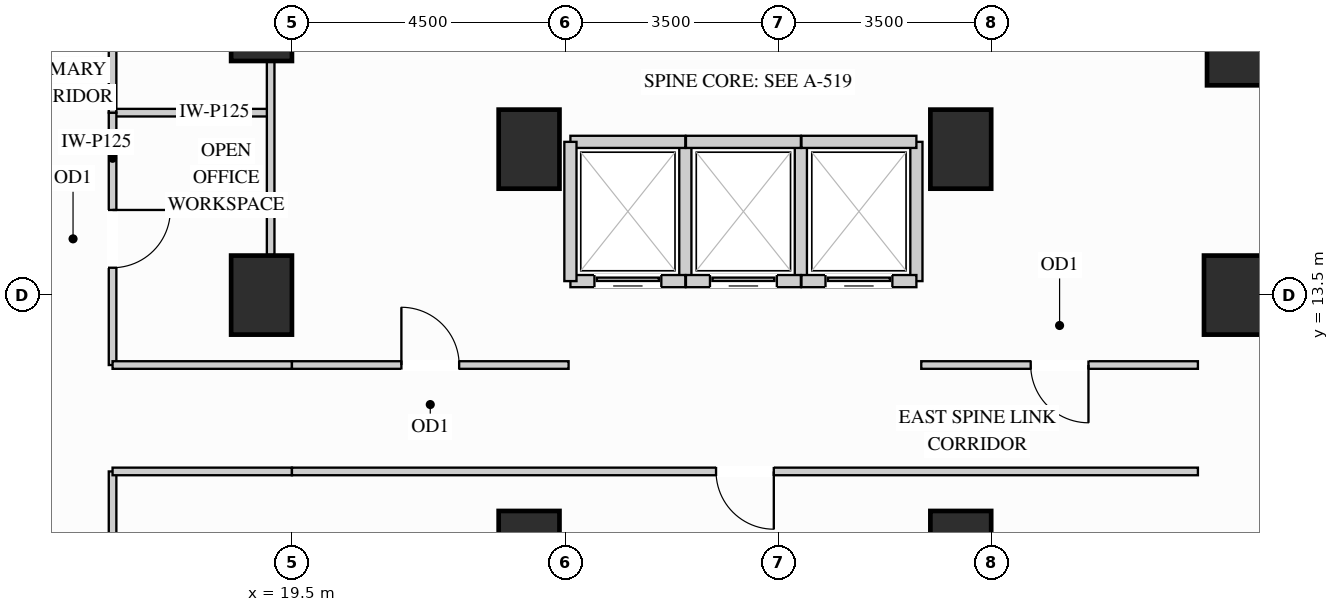
"""IFC4 building model, lengths in metres.
Left out: names, types, materials, properties, quantities, classifications, styles, units other than length and angle.
Written with IfcOpenShell. Run it as: python <this file> out.ifc"""

import sys

from ifc_helpers import new_model, si_unit, direction, frame, frame_2d, origin, origin_2d, place, context, subcontext, project, spatial, rectangle, extrude, source, transform, mapped, element, fill, save


model = new_model("IFC4")
c1 = context("Model", 3, precision=1e-05, world=origin(), true_north=direction((0.0, 1.0)))
c2 = subcontext(c1, "Body", "Model", "MODEL_VIEW")
j1 = project(units=[si_unit("LENGTHUNIT", "METRE"), si_unit("PLANEANGLEUNIT", "RADIAN")], contexts=[c1])
p1 = place(None, origin())
s1 = spatial("IfcSite", under=j1, at=p1, CompositionType="ELEMENT")
p2 = place(p1, origin())
s2 = spatial("IfcBuilding", under=s1, at=p2, CompositionType="ELEMENT")
p3 = place(p2, frame((0.0, 0.0, 44.1)))
s3 = spatial("IfcBuildingStorey", under=s2, at=p3, CompositionType="ELEMENT", Elevation=44.1)
m1 = source(origin(), c2, "Body", "SweptSolid", [
    extrude(rectangle(XDim=0.9, YDim=0.9, at=origin_2d()), origin(), (0.0, 0.0, 1.0), 3.38),
])
p4 = place(p3, frame((35.0, 17.4, 0.0), z_axis=(0.0, 0.0, 1.0), x_axis=(1.0, 0.0, 0.0)))
e1 = element("IfcColumn", 1, at=p4, inside=s3, PredefinedType="COLUMN", context=c2, shape_type="MappedRepresentation", body=[
    mapped(m1, transform((0.0, 0.0, 0.0), x_axis=(1.0, 0.0, 0.0), y_axis=(0.0, 1.0, 0.0), z_axis=(0.0, 0.0, 1.0))),
])
m2 = source(origin(), c2, "Body", "SweptSolid", [
    extrude(rectangle(XDim=1.0, YDim=1.3, at=origin_2d()), origin(), (0.0, 0.0, 1.0), 3.38),
])
for number, where, z_axis, x_axis in (
    (2, (19.0, 13.5, 0.0), (0.0, 0.0, 1.0), (1.0, 0.0, 0.0)),
    (3, (19.0, 18.0, 0.0), (0.0, 0.0, 1.0), (1.0, 0.0, 0.0)),
    (4, (35.0, 13.5, 0.0), (0.0, 0.0, 1.0), (1.0, 0.0, 0.0)),
    (5, (23.4, 15.9, 0.0), (0.0, 0.0, 1.0), (1.0, 0.0, 0.0)),
    (6, (23.4, 9.3, 0.0), (0.0, 0.0, 1.0), (1.0, 0.0, 0.0)),
    (7, (30.5, 15.9, 0.0), (0.0, 0.0, 1.0), (1.0, 0.0, 0.0)),
    (8, (30.5, 9.3, 0.0), (0.0, 0.0, 1.0), (1.0, 0.0, 0.0)),
):
    element("IfcColumn", number, at=place(p3, frame(where, z_axis=z_axis, x_axis=x_axis)), inside=s3, PredefinedType="COLUMN", context=c2, shape_type="MappedRepresentation", body=[
        mapped(m2, transform((0.0, 0.0, 0.0), x_axis=(1.0, 0.0, 0.0), y_axis=(0.0, 1.0, 0.0), z_axis=(0.0, 0.0, 1.0))),
    ])
m3 = source(origin(), c2, "Body", "SweptSolid", [
    extrude(rectangle(XDim=2.6, YDim=0.125, at=frame_2d((1.3, 0.0))), origin(), (0.0, 0.0, 1.0), 2.896),
])
p5 = place(p3, frame((16.55, 16.5, 0.0), z_axis=(0.0, 0.0, 1.0), x_axis=(1.0, 0.0, 0.0)))
e9 = element("IfcWall", 9, at=p5, inside=s3, PredefinedType="PARTITIONING", context=c2, shape_type="MappedRepresentation", body=[
    mapped(m3, transform((0.0, 0.0, 0.0), x_axis=(1.0, 0.0, 0.0), y_axis=(0.0, 1.0, 0.0), z_axis=(0.0, 0.0, 1.0))),
])
m4 = source(origin(), c2, "Body", "SweptSolid", [
    extrude(rectangle(XDim=3.18, YDim=0.125, at=frame_2d((1.59, 0.0))), origin(), (0.0, 0.0, 1.0), 2.67),
])
p6 = place(p3, frame((19.15, 14.16, 0.0), z_axis=(0.0, 0.0, 1.0), x_axis=(0.0, 1.0, 0.0)))
e10 = element("IfcWall", 10, at=p6, inside=s3, PredefinedType="PARTITIONING", context=c2, shape_type="MappedRepresentation", body=[
    mapped(m4, transform((0.0, 0.0, 0.0), x_axis=(1.0, 0.0, 0.0), y_axis=(0.0, 1.0, 0.0), z_axis=(0.0, 0.0, 1.0))),
])
p7 = place(p3, frame((16.55, 12.35, 0.0), z_axis=(0.0, 0.0, 1.0), x_axis=(0.0, 1.0, 0.0)))
e11 = element("IfcWall", 11, at=p7, inside=s3, PredefinedType="PARTITIONING", context=c2, shape_type="SweptSolid", body=[
    extrude(rectangle(XDim=4.15, YDim=0.125, at=frame_2d((2.075, 0.0))), origin(), (0.0, 0.0, 1.0), 3.365),
])
p8 = place(p7, frame((1.6, 0.0, 0.0)))
e12 = element("IfcOpeningElement", 12, at=p8, cuts=e11, PredefinedType="OPENING", context=c2, shape_type="SweptSolid", body=[
    extrude(rectangle(XDim=0.95, YDim=2.15, at=frame_2d((0.475, 1.075))), frame((0.0, 0.073, 0.0), z_axis=(0.0, -1.0, 0.0), x_axis=(1.0, 0.0, 0.0)), (0.0, 0.0, 1.0), 0.145),
])
p9 = place(p3, frame((16.55, 16.5, 0.0), z_axis=(0.0, 0.0, 1.0), x_axis=(0.0, 1.0, 0.0)))
e13 = element("IfcWall", 13, at=p9, inside=s3, PredefinedType="PARTITIONING", context=c2, shape_type="SweptSolid", body=[
    extrude(rectangle(XDim=6.85, YDim=0.125, at=frame_2d((3.425, 0.0))), origin(), (0.0, 0.0, 1.0), 3.365),
])
p10 = place(p9, frame((2.95, 0.0, 0.0)))
e14 = element("IfcOpeningElement", 14, at=p10, cuts=e13, PredefinedType="OPENING", context=c2, shape_type="SweptSolid", body=[
    extrude(rectangle(XDim=0.95, YDim=2.15, at=frame_2d((0.475, 1.075))), frame((0.0, 0.073, 0.0), z_axis=(0.0, -1.0, 0.0), x_axis=(1.0, 0.0, 0.0)), (0.0, 0.0, 1.0), 0.145),
])
p11 = place(p3, frame((16.55, 4.65, 0.0), z_axis=(0.0, 0.0, 1.0), x_axis=(0.0, 1.0, 0.0)))
e15 = element("IfcWall", 15, at=p11, inside=s3, PredefinedType="PARTITIONING", context=c2, shape_type="SweptSolid", body=[
    extrude(rectangle(XDim=5.95, YDim=0.125, at=frame_2d((2.975, 0.0))), origin(), (0.0, 0.0, 1.0), 3.365),
])
p12 = place(p11, frame((2.5, 0.0, 0.0)))
e16 = element("IfcOpeningElement", 16, at=p12, cuts=e15, PredefinedType="OPENING", context=c2, shape_type="SweptSolid", body=[
    extrude(rectangle(XDim=0.95, YDim=2.15, at=frame_2d((0.475, 1.075))), frame((0.0, 0.073, 0.0), z_axis=(0.0, -1.0, 0.0), x_axis=(1.0, 0.0, 0.0)), (0.0, 0.0, 1.0), 0.145),
])
p13 = place(p3, frame((29.85, 12.35, 0.0), z_axis=(0.0, 0.0, 1.0), x_axis=(1.0, 0.0, 0.0)))
e17 = element("IfcWall", 17, at=p13, inside=s3, PredefinedType="PARTITIONING", context=c2, shape_type="SweptSolid", body=[
    extrude(rectangle(XDim=4.55, YDim=0.125, at=frame_2d((2.275, 0.0))), origin(), (0.0, 0.0, 1.0), 3.365),
])
p14 = place(p13, frame((1.8, 0.0, 0.0)))
e18 = element("IfcOpeningElement", 18, at=p14, cuts=e17, PredefinedType="OPENING", context=c2, shape_type="SweptSolid", body=[
    extrude(rectangle(XDim=0.95, YDim=2.15, at=frame_2d((0.475, 1.075))), frame((0.0, 0.073, 0.0), z_axis=(0.0, -1.0, 0.0), x_axis=(1.0, 0.0, 0.0)), (0.0, 0.0, 1.0), 0.145),
])
m5 = source(origin(), c2, "Body", "SweptSolid", [
    extrude(rectangle(XDim=2.95, YDim=0.125, at=frame_2d((1.475, 0.0))), origin(), (0.0, 0.0, 1.0), 3.365),
])
p15 = place(p3, frame((16.55, 12.35, 0.0), z_axis=(0.0, 0.0, 1.0), x_axis=(1.0, 0.0, 0.0)))
e19 = element("IfcWall", 19, at=p15, inside=s3, PredefinedType="PARTITIONING", context=c2, shape_type="MappedRepresentation", body=[
    mapped(m5, transform((0.0, 0.0, 0.0), x_axis=(1.0, 0.0, 0.0), y_axis=(0.0, 1.0, 0.0), z_axis=(0.0, 0.0, 1.0))),
])
p16 = place(p3, frame((19.5, 12.35, 0.0), z_axis=(0.0, 0.0, 1.0), x_axis=(1.0, 0.0, 0.0)))
e20 = element("IfcWall", 20, at=p16, inside=s3, PredefinedType="PARTITIONING", context=c2, shape_type="SweptSolid", body=[
    extrude(rectangle(XDim=4.55, YDim=0.125, at=frame_2d((2.275, 0.0))), origin(), (0.0, 0.0, 1.0), 3.365),
])
p17 = place(p16, frame((1.8, 0.0, 0.0)))
e21 = element("IfcOpeningElement", 21, at=p17, cuts=e20, PredefinedType="OPENING", context=c2, shape_type="SweptSolid", body=[
    extrude(rectangle(XDim=0.95, YDim=2.15, at=frame_2d((0.475, 1.075))), frame((0.0, 0.073, 0.0), z_axis=(0.0, -1.0, 0.0), x_axis=(1.0, 0.0, 0.0)), (0.0, 0.0, 1.0), 0.145),
])
p18 = place(p3, frame((16.55, 10.6, 0.0), z_axis=(0.0, 0.0, 1.0), x_axis=(1.0, 0.0, 0.0)))
e22 = element("IfcWall", 22, at=p18, inside=s3, PredefinedType="PARTITIONING", context=c2, shape_type="MappedRepresentation", body=[
    mapped(m5, transform((0.0, 0.0, 0.0), x_axis=(1.0, 0.0, 0.0), y_axis=(0.0, 1.0, 0.0), z_axis=(0.0, 0.0, 1.0))),
])
p19 = place(p3, frame((19.5, 10.6, 0.0), z_axis=(0.0, 0.0, 1.0), x_axis=(1.0, 0.0, 0.0)))
e23 = element("IfcWall", 23, at=p19, inside=s3, PredefinedType="PARTITIONING", context=c2, shape_type="SweptSolid", body=[
    extrude(rectangle(XDim=14.9, YDim=0.125, at=frame_2d((7.45, 0.0))), origin(), (0.0, 0.0, 1.0), 3.365),
])
p20 = place(p19, frame((6.975, 0.0, 0.0)))
e24 = element("IfcOpeningElement", 24, at=p20, cuts=e23, PredefinedType="OPENING", context=c2, shape_type="SweptSolid", body=[
    extrude(rectangle(XDim=0.95, YDim=2.15, at=frame_2d((0.475, 1.075))), frame((0.0, 0.073, 0.0), z_axis=(0.0, -1.0, 0.0), x_axis=(1.0, 0.0, 0.0)), (0.0, 0.0, 1.0), 0.145),
])
m6 = source(origin(), c2, "Body", "SweptSolid", [
    extrude(rectangle(XDim=2.29, YDim=0.2, at=frame_2d((1.145, 0.0))), origin(), (0.0, 0.0, 1.0), 3.365),
])
p21 = place(p3, frame((25.97, 13.73, 0.0), z_axis=(0.0, 0.0, 1.0), x_axis=(0.0, 1.0, 0.0)))
e25 = element("IfcWall", 25, at=p21, inside=s3, PredefinedType="PARTITIONING", context=c2, shape_type="MappedRepresentation", body=[
    mapped(m6, transform((0.0, 0.0, 0.0), x_axis=(1.0, 0.0, 0.0), y_axis=(0.0, 1.0, 0.0), z_axis=(0.0, 0.0, 1.0))),
])
m7 = source(origin(), c2, "Body", "SweptSolid", [
    extrude(rectangle(XDim=1.89, YDim=0.2, at=frame_2d((0.945, 0.0))), origin(), (0.0, 0.0, 1.0), 2.67),
])
p22 = place(p3, frame((24.08, 16.02, 0.0), z_axis=(0.0, 0.0, 1.0), x_axis=(1.0, 0.0, 0.0)))
e26 = element("IfcWall", 26, at=p22, inside=s3, PredefinedType="PARTITIONING", context=c2, shape_type="MappedRepresentation", body=[
    mapped(m7, transform((0.0, 0.0, 0.0), x_axis=(1.0, 0.0, 0.0), y_axis=(0.0, 1.0, 0.0), z_axis=(0.0, 0.0, 1.0))),
])
p23 = place(p3, frame((24.08, 13.73, 0.0), z_axis=(0.0, 0.0, 1.0), x_axis=(1.0, 0.0, 0.0)))
e27 = element("IfcWall", 27, at=p23, inside=s3, PredefinedType="PARTITIONING", context=c2, shape_type="SweptSolid", body=[
    extrude(rectangle(XDim=1.89, YDim=0.2, at=frame_2d((0.945, 0.0))), origin(), (0.0, 0.0, 1.0), 2.446),
])
p24 = place(p23, frame((0.395, 0.0, 0.0)))
e28 = element("IfcOpeningElement", 28, at=p24, cuts=e27, PredefinedType="OPENING", context=c2, shape_type="SweptSolid", body=[
    extrude(rectangle(XDim=1.1, YDim=2.2, at=frame_2d((0.55, 1.1))), frame((0.0, 0.11, 0.0), z_axis=(0.0, -1.0, 0.0), x_axis=(1.0, 0.0, 0.0)), (0.0, 0.0, 1.0), 0.22),
])
for number, where, z_axis, x_axis in (
    (29, (24.08, 13.73, 0.0), (0.0, 0.0, 1.0), (0.0, 1.0, 0.0)),
    (30, (27.87, 13.73, 0.0), (0.0, 0.0, 1.0), (0.0, 1.0, 0.0)),
):
    element("IfcWall", number, at=place(p3, frame(where, z_axis=z_axis, x_axis=x_axis)), inside=s3, PredefinedType="PARTITIONING", context=c2, shape_type="MappedRepresentation", body=[
        mapped(m6, transform((0.0, 0.0, 0.0), x_axis=(1.0, 0.0, 0.0), y_axis=(0.0, 1.0, 0.0), z_axis=(0.0, 0.0, 1.0))),
    ])
m8 = source(origin(), c2, "Body", "SweptSolid", [
    extrude(rectangle(XDim=1.89, YDim=0.2, at=frame_2d((0.945, 0.0))), origin(), (0.0, 0.0, 1.0), 2.67),
])
p25 = place(p3, frame((25.98, 16.02, 0.0), z_axis=(0.0, 0.0, 1.0), x_axis=(1.0, 0.0, 0.0)))
e31 = element("IfcWall", 31, at=p25, inside=s3, PredefinedType="PARTITIONING", context=c2, shape_type="MappedRepresentation", body=[
    mapped(m8, transform((0.0, 0.0, 0.0), x_axis=(1.0, 0.0, 0.0), y_axis=(0.0, 1.0, 0.0), z_axis=(0.0, 0.0, 1.0))),
])
p26 = place(p3, frame((25.98, 13.73, 0.0), z_axis=(0.0, 0.0, 1.0), x_axis=(1.0, 0.0, 0.0)))
e32 = element("IfcWall", 32, at=p26, inside=s3, PredefinedType="PARTITIONING", context=c2, shape_type="SweptSolid", body=[
    extrude(rectangle(XDim=1.89, YDim=0.2, at=frame_2d((0.945, 0.0))), origin(), (0.0, 0.0, 1.0), 2.446),
])
p27 = place(p26, frame((0.395, 0.0, 0.0)))
e33 = element("IfcOpeningElement", 33, at=p27, cuts=e32, PredefinedType="OPENING", context=c2, shape_type="SweptSolid", body=[
    extrude(rectangle(XDim=1.1, YDim=2.2, at=frame_2d((0.55, 1.1))), frame((0.0, 0.11, 0.0), z_axis=(0.0, -1.0, 0.0), x_axis=(1.0, 0.0, 0.0)), (0.0, 0.0, 1.0), 0.22),
])
p28 = place(p3, frame((29.77, 13.73, 0.0), z_axis=(0.0, 0.0, 1.0), x_axis=(0.0, 1.0, 0.0)))
e34 = element("IfcWall", 34, at=p28, inside=s3, PredefinedType="PARTITIONING", context=c2, shape_type="MappedRepresentation", body=[
    mapped(m6, transform((0.0, 0.0, 0.0), x_axis=(1.0, 0.0, 0.0), y_axis=(0.0, 1.0, 0.0), z_axis=(0.0, 0.0, 1.0))),
])
p29 = place(p3, frame((27.88, 16.02, 0.0), z_axis=(0.0, 0.0, 1.0), x_axis=(1.0, 0.0, 0.0)))
e35 = element("IfcWall", 35, at=p29, inside=s3, PredefinedType="PARTITIONING", context=c2, shape_type="MappedRepresentation", body=[
    mapped(m8, transform((0.0, 0.0, 0.0), x_axis=(1.0, 0.0, 0.0), y_axis=(0.0, 1.0, 0.0), z_axis=(0.0, 0.0, 1.0))),
])
p30 = place(p3, frame((27.88, 13.73, 0.0), z_axis=(0.0, 0.0, 1.0), x_axis=(1.0, 0.0, 0.0)))
e36 = element("IfcWall", 36, at=p30, inside=s3, PredefinedType="PARTITIONING", context=c2, shape_type="SweptSolid", body=[
    extrude(rectangle(XDim=1.89, YDim=0.2, at=frame_2d((0.945, 0.0))), origin(), (0.0, 0.0, 1.0), 2.446),
])
p31 = place(p30, frame((0.395, 0.0, 0.0)))
e37 = element("IfcOpeningElement", 37, at=p31, cuts=e36, PredefinedType="OPENING", context=c2, shape_type="SweptSolid", body=[
    extrude(rectangle(XDim=1.1, YDim=2.2, at=frame_2d((0.55, 1.1))), frame((0.0, 0.11, 0.0), z_axis=(0.0, -1.0, 0.0), x_axis=(1.0, 0.0, 0.0)), (0.0, 0.0, 1.0), 0.22),
])
m9 = source(origin(), c2, "Body", "SweptSolid", [
    extrude(rectangle(XDim=1.1, YDim=2.2, at=frame_2d((0.55, 1.1))), frame((0.0, 0.025, 0.0), z_axis=(0.0, -1.0, 0.0), x_axis=(1.0, 0.0, 0.0)), (0.0, 0.0, 1.0), 0.05),
])
p32 = place(p24, origin())
e38 = element("IfcDoor", 38, at=p32, inside=s3, OperationType="SLIDING_TO_LEFT", PredefinedType="DOOR", context=c2, shape_type="MappedRepresentation", body=[
    mapped(m9, transform((0.0, 0.0, 0.0), x_axis=(1.0, 0.0, 0.0), y_axis=(0.0, 1.0, 0.0), z_axis=(0.0, 0.0, 1.0))),
])
fill(e28, e38)
p33 = place(p27, origin())
e39 = element("IfcDoor", 39, at=p33, inside=s3, OperationType="SLIDING_TO_LEFT", PredefinedType="DOOR", context=c2, shape_type="MappedRepresentation", body=[
    mapped(m9, transform((0.0, 0.0, 0.0), x_axis=(1.0, 0.0, 0.0), y_axis=(0.0, 1.0, 0.0), z_axis=(0.0, 0.0, 1.0))),
])
fill(e33, e39)
p34 = place(p31, origin())
e40 = element("IfcDoor", 40, at=p34, inside=s3, OperationType="SLIDING_TO_LEFT", PredefinedType="DOOR", context=c2, shape_type="MappedRepresentation", body=[
    mapped(m9, transform((0.0, 0.0, 0.0), x_axis=(1.0, 0.0, 0.0), y_axis=(0.0, 1.0, 0.0), z_axis=(0.0, 0.0, 1.0))),
])
fill(e37, e40)
m10 = source(origin(), c2, "Body", "SweptSolid", [
    extrude(rectangle(XDim=0.95, YDim=2.15, at=frame_2d((0.475, 1.075))), frame((0.0, 0.025, 0.0), z_axis=(0.0, -1.0, 0.0), x_axis=(1.0, 0.0, 0.0)), (0.0, 0.0, 1.0), 0.05),
])
p35 = place(p8, origin())
e41 = element("IfcDoor", 41, at=p35, inside=s3, OperationType="SINGLE_SWING_RIGHT", PredefinedType="DOOR", context=c2, shape_type="MappedRepresentation", body=[
    mapped(m10, transform((0.0, 0.0, 0.0), x_axis=(1.0, 0.0, 0.0), y_axis=(0.0, 1.0, 0.0), z_axis=(0.0, 0.0, 1.0))),
])
fill(e12, e41)
p36 = place(p17, origin())
e42 = element("IfcDoor", 42, at=p36, inside=s3, OperationType="SINGLE_SWING_LEFT", PredefinedType="DOOR", context=c2, shape_type="MappedRepresentation", body=[
    mapped(m10, transform((0.0, 0.0, 0.0), x_axis=(1.0, 0.0, 0.0), y_axis=(0.0, 1.0, 0.0), z_axis=(0.0, 0.0, 1.0))),
])
fill(e21, e42)
p37 = place(p14, origin())
e43 = element("IfcDoor", 43, at=p37, inside=s3, OperationType="SINGLE_SWING_RIGHT", PredefinedType="DOOR", context=c2, shape_type="MappedRepresentation", body=[
    mapped(m10, transform((0.0, 0.0, 0.0), x_axis=(1.0, 0.0, 0.0), y_axis=(0.0, 1.0, 0.0), z_axis=(0.0, 0.0, 1.0))),
])
fill(e18, e43)
p38 = place(p20, origin())
e44 = element("IfcDoor", 44, at=p38, inside=s3, OperationType="SINGLE_SWING_RIGHT", PredefinedType="DOOR", context=c2, shape_type="MappedRepresentation", body=[
    mapped(m10, transform((0.0, 0.0, 0.0), x_axis=(1.0, 0.0, 0.0), y_axis=(0.0, 1.0, 0.0), z_axis=(0.0, 0.0, 1.0))),
])
fill(e24, e44)
save(model, sys.argv[1])
